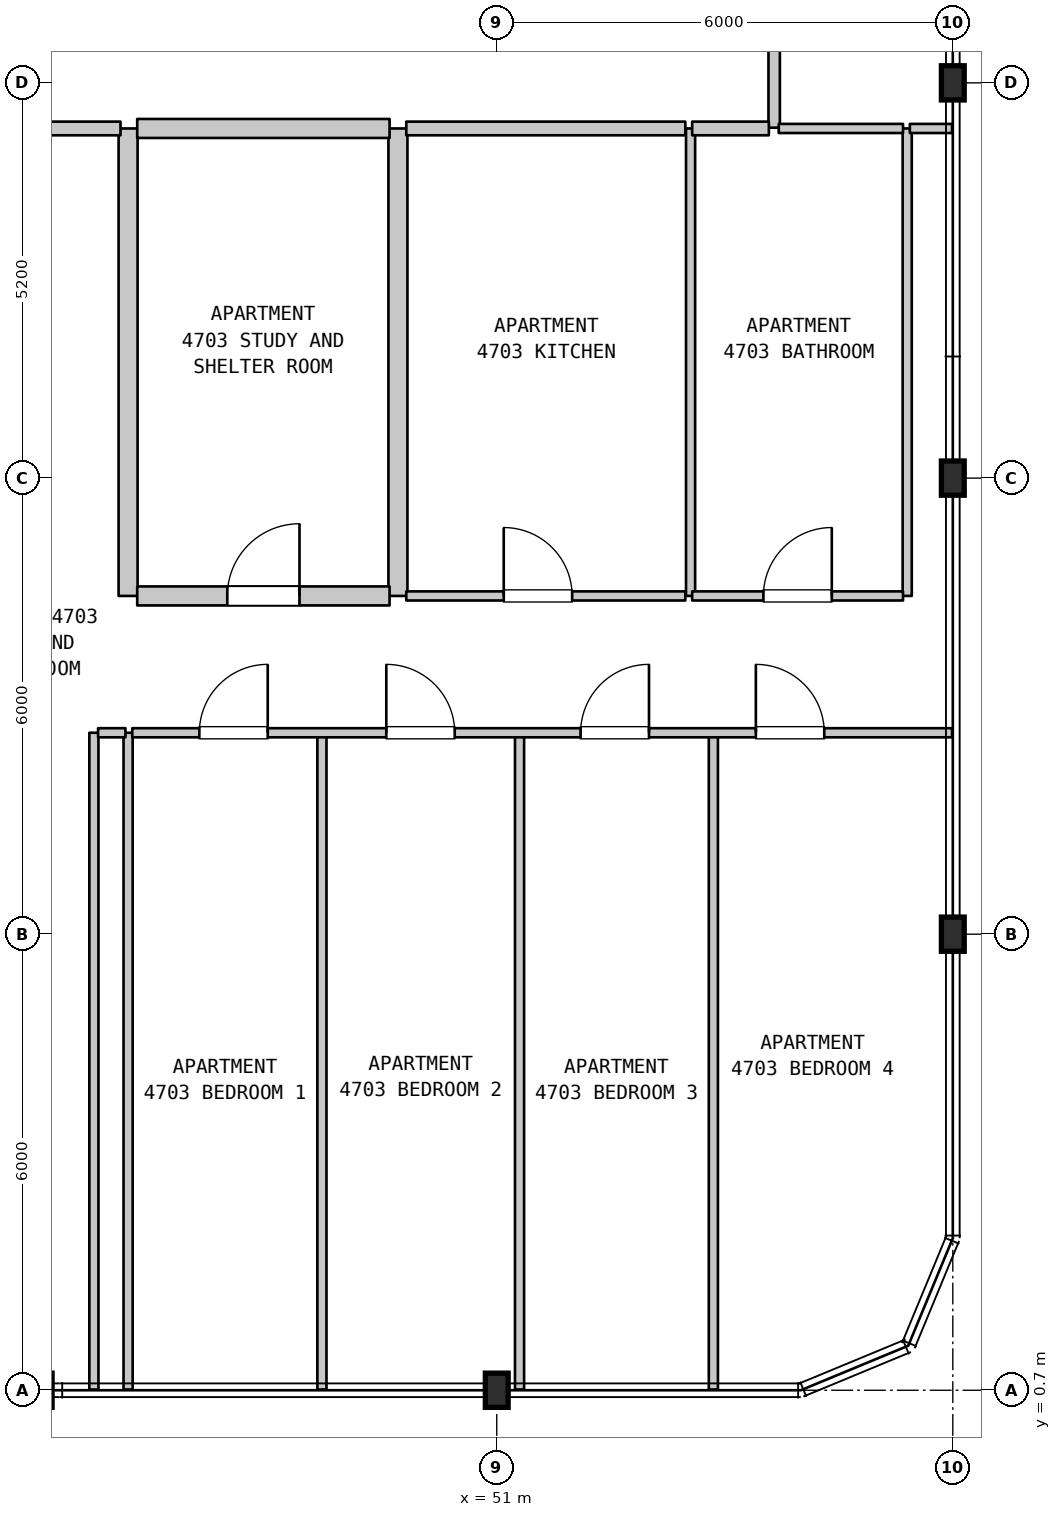
"""IFC4 building model, lengths in metres.
Left out: names, types, materials, properties, quantities, classifications, styles, units other than length and angle.
Written with IfcOpenShell. Run it as: python <this file> out.ifc"""

import sys

from ifc_helpers import new_model, si_unit, direction, frame, frame_2d, origin, origin_2d, place, context, subcontext, project, spatial, rectangle, i_section, extrude, element, fill, save


model = new_model("IFC4")
c1 = context("Model", 3, precision=1e-05, world=origin(), true_north=direction((0.0, 1.0)))
c2 = subcontext(c1, "Body", "Model", "MODEL_VIEW")
j1 = project(units=[si_unit("LENGTHUNIT", "METRE"), si_unit("PLANEANGLEUNIT", "RADIAN")], contexts=[c1])
p1 = place(None, origin())
s1 = spatial("IfcSite", under=j1, at=p1, CompositionType="ELEMENT")
p2 = place(p1, origin())
s2 = spatial("IfcBuilding", under=s1, at=p2, CompositionType="ELEMENT")
p3 = place(p2, frame((0.0, 0.0, 192.1)))
s3 = spatial("IfcBuildingStorey", under=s2, at=p3, CompositionType="ELEMENT", Elevation=192.1)
for number, where, z_axis, x_axis in (
    (1, (51.0, 0.7, 0.0), (0.0, 0.0, 1.0), (1.0, 0.0, 0.0)),
    (2, (57.0, 6.7, 0.0), (0.0, 0.0, 1.0), (1.0, 0.0, 0.0)),
    (3, (57.0, 12.7, 0.0), (0.0, 0.0, 1.0), (1.0, 0.0, 0.0)),
    (4, (57.0, 17.9, 0.0), (0.0, 0.0, 1.0), (1.0, 0.0, 0.0)),
):
    element("IfcColumn", number, at=place(p3, frame(where, z_axis=z_axis, x_axis=x_axis)), inside=s3, PredefinedType="COLUMN", context=c2, shape_type="SweptSolid", body=[
        extrude(i_section(OverallWidth=0.3, OverallDepth=0.45, WebThickness=0.014, FlangeThickness=0.026, FilletRadius=0.027, at=origin_2d()), origin(), (0.0, 0.0, 1.0), 3.7),
    ])
for number, where, z_axis, x_axis in (
    (5, (45.7, 0.71, 0.0), (0.0, 0.0, 1.0), (0.0, 1.0, 0.0)),
    (6, (46.15, 0.71, 0.0), (0.0, 0.0, 1.0), (0.0, 1.0, 0.0)),
):
    element("IfcWall", number, at=place(p3, frame(where, z_axis=z_axis, x_axis=x_axis)), inside=s3, PredefinedType="PARTITIONING", context=c2, shape_type="SweptSolid", body=[
        extrude(rectangle(XDim=8.64, YDim=0.12, at=frame_2d((4.32, 0.0))), origin(), (0.0, 0.0, 1.0), 3.39),
    ])
p4 = place(p3, frame((46.15, 11.15, 0.0), z_axis=(0.0, 0.0, 1.0), x_axis=(0.0, 1.0, 0.0)))
e7 = element("IfcWall", 7, at=p4, inside=s3, PredefinedType="STANDARD", context=c2, shape_type="SweptSolid", body=[
    extrude(rectangle(XDim=6.15, YDim=0.25, at=frame_2d((3.075, 0.0))), origin(), (0.0, 0.0, 1.0), 3.39),
])
p5 = place(p3, frame((48.7, 0.71, 0.0), z_axis=(0.0, 0.0, 1.0), x_axis=(0.0, 1.0, 0.0)))
e8 = element("IfcWall", 8, at=p5, inside=s3, PredefinedType="PARTITIONING", context=c2, shape_type="SweptSolid", body=[
    extrude(rectangle(XDim=8.64, YDim=0.12, at=frame_2d((4.32, 0.0))), origin(), (0.0, 0.0, 1.0), 3.39),
])
p6 = place(p3, frame((49.7, 11.15, 0.0), z_axis=(0.0, 0.0, 1.0), x_axis=(0.0, 1.0, 0.0)))
e9 = element("IfcWall", 9, at=p6, inside=s3, PredefinedType="STANDARD", context=c2, shape_type="SweptSolid", body=[
    extrude(rectangle(XDim=6.15, YDim=0.25, at=frame_2d((3.075, 0.0))), origin(), (0.0, 0.0, 1.0), 3.39),
])
p7 = place(p3, frame((51.3, 0.71, 0.0), z_axis=(0.0, 0.0, 1.0), x_axis=(0.0, 1.0, 0.0)))
e10 = element("IfcWall", 10, at=p7, inside=s3, PredefinedType="PARTITIONING", context=c2, shape_type="SweptSolid", body=[
    extrude(rectangle(XDim=8.64, YDim=0.12, at=frame_2d((4.32, 0.0))), origin(), (0.0, 0.0, 1.0), 3.39),
])
p8 = place(p3, frame((53.55, 11.15, 0.0), z_axis=(0.0, 0.0, 1.0), x_axis=(0.0, 1.0, 0.0)))
e11 = element("IfcWall", 11, at=p8, inside=s3, PredefinedType="PARTITIONING", context=c2, shape_type="SweptSolid", body=[
    extrude(rectangle(XDim=6.15, YDim=0.12, at=frame_2d((3.075, 0.0))), origin(), (0.0, 0.0, 1.0), 3.39),
])
p9 = place(p3, frame((53.85, 0.71, 0.0), z_axis=(0.0, 0.0, 1.0), x_axis=(0.0, 1.0, 0.0)))
e12 = element("IfcWall", 12, at=p9, inside=s3, PredefinedType="PARTITIONING", context=c2, shape_type="SweptSolid", body=[
    extrude(rectangle(XDim=8.64, YDim=0.12, at=frame_2d((4.32, 0.0))), origin(), (0.0, 0.0, 1.0), 3.39),
])
p10 = place(p3, frame((54.65, 17.31, 0.0), z_axis=(0.0, 0.0, 1.0), x_axis=(0.0, 1.0, 0.0)))
e13 = element("IfcWall", 13, at=p10, inside=s3, PredefinedType="STANDARD", context=c2, shape_type="SweptSolid", body=[
    extrude(rectangle(XDim=2.19, YDim=0.15, at=frame_2d((1.095, 0.0))), origin(), (0.0, 0.0, 1.0), 3.39),
])
p11 = place(p3, frame((56.4, 11.15, 0.0), z_axis=(0.0, 0.0, 1.0), x_axis=(0.0, 1.0, 0.0)))
e14 = element("IfcWall", 14, at=p11, inside=s3, PredefinedType="PARTITIONING", context=c2, shape_type="SweptSolid", body=[
    extrude(rectangle(XDim=6.15, YDim=0.12, at=frame_2d((3.075, 0.0))), origin(), (0.0, 0.0, 1.0), 3.39),
])
p12 = place(p3, frame((45.755, 9.35, 0.0), z_axis=(0.0, 0.0, 1.0), x_axis=(1.0, 0.0, 0.0)))
e15 = element("IfcWall", 15, at=p12, inside=s3, PredefinedType="PARTITIONING", context=c2, shape_type="SweptSolid", body=[
    extrude(rectangle(XDim=0.36, YDim=0.12, at=frame_2d((0.18, 0.0))), origin(), (0.0, 0.0, 1.0), 3.39),
])
p13 = place(p3, frame((46.205, 9.35, 0.0), z_axis=(0.0, 0.0, 1.0), x_axis=(1.0, 0.0, 0.0)))
e16 = element("IfcWall", 16, at=p13, inside=s3, PredefinedType="PARTITIONING", context=c2, shape_type="SweptSolid", body=[
    extrude(rectangle(XDim=10.785, YDim=0.12, at=frame_2d((5.393, 0.0))), origin(), (0.0, 0.0, 1.0), 3.39),
])
p14 = place(p13, frame((0.882, 0.0, 0.0)))
e17 = element("IfcOpeningElement", 17, at=p14, cuts=e16, PredefinedType="OPENING", context=c2, shape_type="SweptSolid", body=[
    extrude(rectangle(XDim=0.9, YDim=2.15, at=frame_2d((0.45, 1.075))), frame((0.0, 0.07, 0.0), z_axis=(0.0, -1.0, 0.0), x_axis=(1.0, 0.0, 0.0)), (0.0, 0.0, 1.0), 0.14),
])
p15 = place(p13, frame((3.342, 0.0, 0.0)))
e18 = element("IfcOpeningElement", 18, at=p15, cuts=e16, PredefinedType="OPENING", context=c2, shape_type="SweptSolid", body=[
    extrude(rectangle(XDim=0.9, YDim=2.15, at=frame_2d((0.45, 1.075))), frame((0.0, 0.07, 0.0), z_axis=(0.0, -1.0, 0.0), x_axis=(1.0, 0.0, 0.0)), (0.0, 0.0, 1.0), 0.14),
])
p16 = place(p13, frame((5.898, 0.0, 0.0)))
e19 = element("IfcOpeningElement", 19, at=p16, cuts=e16, PredefinedType="OPENING", context=c2, shape_type="SweptSolid", body=[
    extrude(rectangle(XDim=0.9, YDim=2.15, at=frame_2d((0.45, 1.075))), frame((0.0, 0.07, 0.0), z_axis=(0.0, -1.0, 0.0), x_axis=(1.0, 0.0, 0.0)), (0.0, 0.0, 1.0), 0.14),
])
p17 = place(p13, frame((8.204, 0.0, 0.0)))
e20 = element("IfcOpeningElement", 20, at=p17, cuts=e16, PredefinedType="OPENING", context=c2, shape_type="SweptSolid", body=[
    extrude(rectangle(XDim=0.9, YDim=2.15, at=frame_2d((0.45, 1.075))), frame((0.0, 0.07, 0.0), z_axis=(0.0, -1.0, 0.0), x_axis=(1.0, 0.0, 0.0)), (0.0, 0.0, 1.0), 0.14),
])
p18 = place(p3, frame((46.27, 11.15, 0.0), z_axis=(0.0, 0.0, 1.0), x_axis=(1.0, 0.0, 0.0)))
e21 = element("IfcWall", 21, at=p18, inside=s3, PredefinedType="STANDARD", context=c2, shape_type="SweptSolid", body=[
    extrude(rectangle(XDim=3.32, YDim=0.25, at=frame_2d((1.66, 0.0))), origin(), (0.0, 0.0, 1.0), 3.39),
])
p19 = place(p18, frame((1.185, 0.0, 0.0)))
e22 = element("IfcOpeningElement", 22, at=p19, cuts=e21, PredefinedType="OPENING", context=c2, shape_type="SweptSolid", body=[
    extrude(rectangle(XDim=0.95, YDim=2.15, at=frame_2d((0.475, 1.075))), frame((0.0, 0.135, 0.0), z_axis=(0.0, -1.0, 0.0), x_axis=(1.0, 0.0, 0.0)), (0.0, 0.0, 1.0), 0.27),
])
p20 = place(p3, frame((49.81, 11.15, 0.0), z_axis=(0.0, 0.0, 1.0), x_axis=(1.0, 0.0, 0.0)))
e23 = element("IfcWall", 23, at=p20, inside=s3, PredefinedType="PARTITIONING", context=c2, shape_type="SweptSolid", body=[
    extrude(rectangle(XDim=3.671, YDim=0.12, at=frame_2d((1.835, 0.0))), origin(), (0.0, 0.0, 1.0), 3.39),
])
p21 = place(p20, frame((1.282, 0.0, 0.0)))
e24 = element("IfcOpeningElement", 24, at=p21, cuts=e23, PredefinedType="OPENING", context=c2, shape_type="SweptSolid", body=[
    extrude(rectangle(XDim=0.9, YDim=2.15, at=frame_2d((0.45, 1.075))), frame((0.0, 0.07, 0.0), z_axis=(0.0, -1.0, 0.0), x_axis=(1.0, 0.0, 0.0)), (0.0, 0.0, 1.0), 0.14),
])
p22 = place(p3, frame((53.571, 11.15, 0.0), z_axis=(0.0, 0.0, 1.0), x_axis=(1.0, 0.0, 0.0)))
e25 = element("IfcWall", 25, at=p22, inside=s3, PredefinedType="PARTITIONING", context=c2, shape_type="SweptSolid", body=[
    extrude(rectangle(XDim=2.774, YDim=0.12, at=frame_2d((1.387, 0.0))), origin(), (0.0, 0.0, 1.0), 3.39),
])
p23 = place(p22, frame((0.937, 0.0, 0.0)))
e26 = element("IfcOpeningElement", 26, at=p23, cuts=e25, PredefinedType="OPENING", context=c2, shape_type="SweptSolid", body=[
    extrude(rectangle(XDim=0.9, YDim=2.1, at=frame_2d((0.45, 1.05))), frame((0.0, 0.07, 0.0), z_axis=(0.0, -1.0, 0.0), x_axis=(1.0, 0.0, 0.0)), (0.0, 0.0, 1.0), 0.14),
])
p24 = place(p3, frame((40.505, 17.3, 0.0), z_axis=(0.0, 0.0, 1.0), x_axis=(1.0, 0.0, 0.0)))
e27 = element("IfcWall", 27, at=p24, inside=s3, PredefinedType="STANDARD", context=c2, shape_type="SweptSolid", body=[
    extrude(rectangle(XDim=5.545, YDim=0.18, at=frame_2d((2.772, 0.0))), origin(), (0.0, 0.0, 1.0), 3.39),
])
p25 = place(p24, frame((2.305, 0.0, 0.0)))
e28 = element("IfcOpeningElement", 28, at=p25, cuts=e27, PredefinedType="OPENING", context=c2, shape_type="SweptSolid", body=[
    extrude(rectangle(XDim=1.0, YDim=2.15, at=frame_2d((0.5, 1.075))), frame((0.0, 0.1, 0.0), z_axis=(0.0, -1.0, 0.0), x_axis=(1.0, 0.0, 0.0)), (0.0, 0.0, 1.0), 0.2),
])
p26 = place(p3, frame((46.27, 17.3, 0.0), z_axis=(0.0, 0.0, 1.0), x_axis=(1.0, 0.0, 0.0)))
e29 = element("IfcWall", 29, at=p26, inside=s3, PredefinedType="STANDARD", context=c2, shape_type="SweptSolid", body=[
    extrude(rectangle(XDim=3.32, YDim=0.25, at=frame_2d((1.66, 0.0))), origin(), (0.0, 0.0, 1.0), 3.39),
])
p27 = place(p3, frame((49.81, 17.3, 0.0), z_axis=(0.0, 0.0, 1.0), x_axis=(1.0, 0.0, 0.0)))
e30 = element("IfcWall", 30, at=p27, inside=s3, PredefinedType="STANDARD", context=c2, shape_type="SweptSolid", body=[
    extrude(rectangle(XDim=3.671, YDim=0.18, at=frame_2d((1.835, 0.0))), origin(), (0.0, 0.0, 1.0), 3.39),
])
p28 = place(p3, frame((53.571, 17.3, 0.0), z_axis=(0.0, 0.0, 1.0), x_axis=(1.0, 0.0, 0.0)))
e31 = element("IfcWall", 31, at=p28, inside=s3, PredefinedType="STANDARD", context=c2, shape_type="SweptSolid", body=[
    extrude(rectangle(XDim=1.009, YDim=0.18, at=frame_2d((0.504, 0.0))), origin(), (0.0, 0.0, 1.0), 3.39),
])
p29 = place(p3, frame((54.71, 17.3, 0.0), z_axis=(0.0, 0.0, 1.0), x_axis=(1.0, 0.0, 0.0)))
e32 = element("IfcWall", 32, at=p29, inside=s3, PredefinedType="PARTITIONING", context=c2, shape_type="SweptSolid", body=[
    extrude(rectangle(XDim=1.635, YDim=0.12, at=frame_2d((0.817, 0.0))), origin(), (0.0, 0.0, 1.0), 3.39),
])
p30 = place(p3, frame((56.435, 17.3, 0.0), z_axis=(0.0, 0.0, 1.0), x_axis=(1.0, 0.0, 0.0)))
e33 = element("IfcWall", 33, at=p30, inside=s3, PredefinedType="PARTITIONING", context=c2, shape_type="SweptSolid", body=[
    extrude(rectangle(XDim=0.555, YDim=0.12, at=frame_2d((0.277, 0.0))), origin(), (0.0, 0.0, 1.0), 3.39),
])
p31 = place(p14, origin())
e34 = element("IfcDoor", 34, at=p31, inside=s3, OperationType="SINGLE_SWING_RIGHT", PredefinedType="DOOR", context=c2, shape_type="SweptSolid", body=[
    extrude(rectangle(XDim=0.9, YDim=2.15, at=frame_2d((0.45, 1.075))), frame((0.0, 0.025, 0.0), z_axis=(0.0, -1.0, 0.0), x_axis=(1.0, 0.0, 0.0)), (0.0, 0.0, 1.0), 0.05),
])
fill(e17, e34)
p32 = place(p15, origin())
e35 = element("IfcDoor", 35, at=p32, inside=s3, OperationType="SINGLE_SWING_LEFT", PredefinedType="DOOR", context=c2, shape_type="SweptSolid", body=[
    extrude(rectangle(XDim=0.9, YDim=2.15, at=frame_2d((0.45, 1.075))), frame((0.0, 0.025, 0.0), z_axis=(0.0, -1.0, 0.0), x_axis=(1.0, 0.0, 0.0)), (0.0, 0.0, 1.0), 0.05),
])
fill(e18, e35)
p33 = place(p16, origin())
e36 = element("IfcDoor", 36, at=p33, inside=s3, OperationType="SINGLE_SWING_RIGHT", PredefinedType="DOOR", context=c2, shape_type="SweptSolid", body=[
    extrude(rectangle(XDim=0.9, YDim=2.15, at=frame_2d((0.45, 1.075))), frame((0.0, 0.025, 0.0), z_axis=(0.0, -1.0, 0.0), x_axis=(1.0, 0.0, 0.0)), (0.0, 0.0, 1.0), 0.05),
])
fill(e19, e36)
p34 = place(p17, origin())
e37 = element("IfcDoor", 37, at=p34, inside=s3, OperationType="SINGLE_SWING_LEFT", PredefinedType="DOOR", context=c2, shape_type="SweptSolid", body=[
    extrude(rectangle(XDim=0.9, YDim=2.15, at=frame_2d((0.45, 1.075))), frame((0.0, 0.025, 0.0), z_axis=(0.0, -1.0, 0.0), x_axis=(1.0, 0.0, 0.0)), (0.0, 0.0, 1.0), 0.05),
])
fill(e20, e37)
p35 = place(p19, origin())
e38 = element("IfcDoor", 38, at=p35, inside=s3, OperationType="SINGLE_SWING_RIGHT", PredefinedType="DOOR", context=c2, shape_type="SweptSolid", body=[
    extrude(rectangle(XDim=0.95, YDim=2.15, at=frame_2d((0.475, 1.075))), frame((0.0, 0.025, 0.0), z_axis=(0.0, -1.0, 0.0), x_axis=(1.0, 0.0, 0.0)), (0.0, 0.0, 1.0), 0.05),
])
fill(e22, e38)
p36 = place(p21, origin())
e39 = element("IfcDoor", 39, at=p36, inside=s3, OperationType="SINGLE_SWING_LEFT", PredefinedType="DOOR", context=c2, shape_type="SweptSolid", body=[
    extrude(rectangle(XDim=0.9, YDim=2.15, at=frame_2d((0.45, 1.075))), frame((0.0, 0.025, 0.0), z_axis=(0.0, -1.0, 0.0), x_axis=(1.0, 0.0, 0.0)), (0.0, 0.0, 1.0), 0.05),
])
fill(e24, e39)
p37 = place(p23, origin())
e40 = element("IfcDoor", 40, at=p37, inside=s3, OperationType="SINGLE_SWING_RIGHT", PredefinedType="DOOR", context=c2, shape_type="SweptSolid", body=[
    extrude(rectangle(XDim=0.9, YDim=2.1, at=frame_2d((0.45, 1.05))), frame((0.0, 0.025, 0.0), z_axis=(0.0, -1.0, 0.0), x_axis=(1.0, 0.0, 0.0)), (0.0, 0.0, 1.0), 0.05),
])
fill(e26, e40)
save(model, sys.argv[1])
